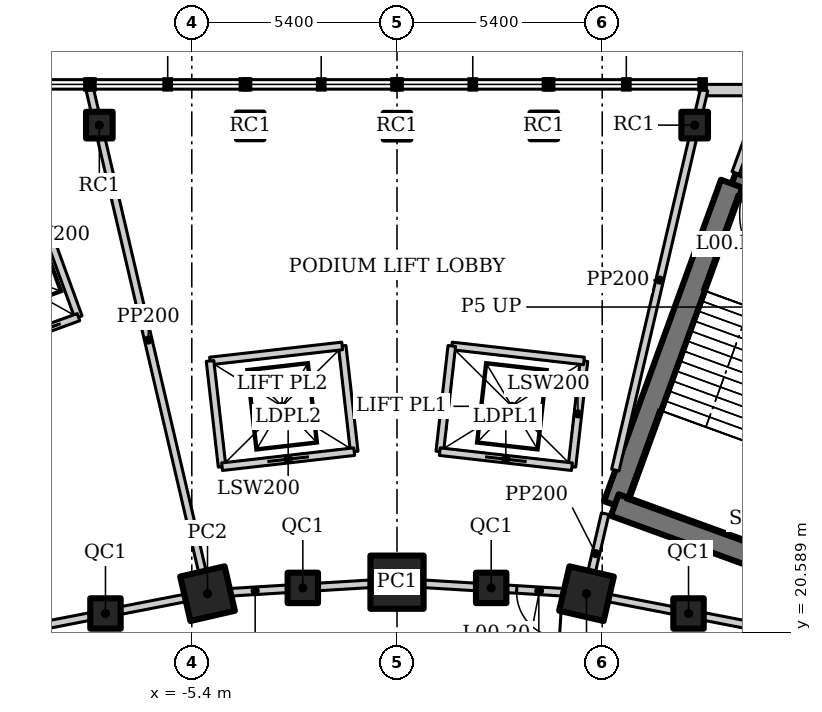
"""IFC4 building model, lengths in metres.
Left out: names, types, materials, properties, quantities, classifications, styles, units other than length and angle.
Written with IfcOpenShell. Run it as: python <this file> out.ifc"""

import sys

from ifc_helpers import new_model, si_unit, direction, frame, frame_2d, origin, origin_2d, place, context, subcontext, project, spatial, rectangle, hollow_rectangle, extrude, element, fill, save


model = new_model("IFC4")
c1 = context("Model", 3, precision=1e-05, world=origin(), true_north=direction((0.0, 1.0)))
c2 = subcontext(c1, "Body", "Model", "MODEL_VIEW")
j1 = project(units=[si_unit("LENGTHUNIT", "METRE"), si_unit("PLANEANGLEUNIT", "RADIAN")], contexts=[c1])
p1 = place(None, origin())
s1 = spatial("IfcSite", under=j1, at=p1, CompositionType="ELEMENT")
p2 = place(p1, origin())
s2 = spatial("IfcBuilding", under=s1, at=p2, CompositionType="ELEMENT")
p3 = place(p2, origin())
s3 = spatial("IfcBuildingStorey", under=s2, at=p3, CompositionType="ELEMENT", Elevation=0.0)
p4 = place(p3, frame((4.986, 21.598, 0.0), z_axis=(0.0, 0.0, 1.0), x_axis=(0.224951054344, 0.974370064785, 0.0)))
e1 = element("IfcColumn", 1, at=p4, inside=s3, PredefinedType="COLUMN", context=c2, shape_type="SweptSolid", body=[
    extrude(hollow_rectangle(XDim=1.2, YDim=1.2, WallThickness=0.1, at=origin_2d()), origin(), (0.0, 0.0, 1.0), 6.5),
])
p5 = place(p3, frame((0.0, 21.9, 0.0), z_axis=(0.0, 0.0, 1.0), x_axis=(1.0, 0.0, 0.0)))
e2 = element("IfcColumn", 2, at=p5, inside=s3, PredefinedType="COLUMN", context=c2, shape_type="SweptSolid", body=[
    extrude(hollow_rectangle(XDim=1.4, YDim=1.4, WallThickness=0.1, at=origin_2d()), origin(), (0.0, 0.0, 1.0), 6.5),
])
p6 = place(p3, frame((-4.986, 21.598, 0.0), z_axis=(0.0, 0.0, 1.0), x_axis=(0.974370064785, 0.224951054344, 0.0)))
e3 = element("IfcColumn", 3, at=p6, inside=s3, PredefinedType="COLUMN", context=c2, shape_type="SweptSolid", body=[
    extrude(hollow_rectangle(XDim=1.2, YDim=1.2, WallThickness=0.1, at=origin_2d()), origin(), (0.0, 0.0, 1.0), 6.5),
])
for number, where, z_axis, x_axis in (
    (4, (7.671, 21.076, 0.0), (0.0, 0.0, 1.0), (1.0, 0.0, 0.0)),
    (5, (2.478, 21.75, 0.0), (0.0, 0.0, 1.0), (1.0, 0.0, 0.0)),
    (6, (-2.478, 21.75, 0.0), (0.0, 0.0, 1.0), (1.0, 0.0, 0.0)),
    (7, (-7.671, 21.076, 0.0), (0.0, 0.0, 1.0), (1.0, 0.0, 0.0)),
):
    element("IfcColumn", number, at=place(p3, frame(where, z_axis=z_axis, x_axis=x_axis)), inside=s3, PredefinedType="COLUMN", context=c2, shape_type="SweptSolid", body=[
        extrude(hollow_rectangle(XDim=0.8, YDim=0.8, WallThickness=0.05, at=origin_2d()), origin(), (0.0, 0.0, 1.0), 6.5),
    ])
for number, where, z_axis, x_axis in (
    (8, (3.863, 33.907, 0.0), (0.0, 0.0, 1.0), (1.0, 0.0, 0.0)),
    (9, (-3.863, 33.907, 0.0), (0.0, 0.0, 1.0), (1.0, 0.0, 0.0)),
    (10, (7.833, 33.928, 0.0), (0.0, 0.0, 1.0), (1.0, 0.0, 0.0)),
    (11, (0.0, 33.9, 0.0), (0.0, 0.0, 1.0), (1.0, 0.0, 0.0)),
    (12, (-7.833, 33.928, 0.0), (0.0, 0.0, 1.0), (1.0, 0.0, 0.0)),
):
    element("IfcColumn", number, at=place(p3, frame(where, z_axis=z_axis, x_axis=x_axis)), inside=s3, PredefinedType="COLUMN", context=c2, shape_type="SweptSolid", body=[
        extrude(hollow_rectangle(XDim=0.7, YDim=0.7, WallThickness=0.04, at=origin_2d()), origin(), (0.0, 0.0, 1.0), 6.5),
    ])
p7 = place(p3, frame((12.779, 34.85, 0.0), z_axis=(0.0, 0.0, 1.0), x_axis=(-1.0, 0.0, 0.0)))
e13 = element("IfcWall", 13, at=p7, inside=s3, PredefinedType="SOLIDWALL", context=c2, shape_type="SweptSolid", body=[
    extrude(rectangle(XDim=4.739, YDim=0.3, at=frame_2d((2.369, 0.0))), origin(), (0.0, 0.0, 1.0), 6.3),
])
p8 = place(p7, frame((0.75, 0.0, 0.0)))
e14 = element("IfcOpeningElement", 14, at=p8, cuts=e13, PredefinedType="OPENING", context=c2, shape_type="SweptSolid", body=[
    extrude(rectangle(XDim=2.0, YDim=2.1, at=frame_2d((1.0, 1.05))), frame((0.0, 0.16, 0.0), z_axis=(0.0, -1.0, 0.0), x_axis=(1.0, 0.0, 0.0)), (0.0, 0.0, 1.0), 0.32),
])
p9 = place(p3, frame((8.911, 32.669, 0.0), z_axis=(0.0, 0.0, 1.0), x_axis=(0.342026533871, 0.939690294793, 0.0)))
e15 = element("IfcWall", 15, at=p9, inside=s3, PredefinedType="SOLIDWALL", context=c2, shape_type="SweptSolid", body=[
    extrude(rectangle(XDim=3.25, YDim=0.2, at=frame_2d((1.625, 0.0))), origin(), (0.0, 0.0, 1.0), 6.3),
])
p10 = place(p3, frame((10.463, 20.534, 0.0), z_axis=(0.0, 0.0, 1.0), x_axis=(-0.98163593748, 0.190763954266, 0.0)))
e16 = element("IfcWall", 16, at=p10, inside=s3, PredefinedType="SOLIDWALL", context=c2, shape_type="SweptSolid", body=[
    extrude(rectangle(XDim=2.844, YDim=0.2, at=frame_2d((1.422, 0.0))), origin(), (0.0, 0.0, 1.0), 5.896),
])
p11 = place(p3, frame((7.671, 21.076, 0.0), z_axis=(0.0, 0.0, 1.0), x_axis=(-0.981637218105, 0.190757364289, 0.0)))
e17 = element("IfcWall", 17, at=p11, inside=s3, PredefinedType="SOLIDWALL", context=c2, shape_type="SweptSolid", body=[
    extrude(rectangle(XDim=2.735, YDim=0.2, at=frame_2d((1.368, 0.0))), origin(), (0.0, 0.0, 1.0), 5.896),
])
p12 = place(p3, frame((4.986, 21.598, 0.0), z_axis=(0.0, 0.0, 1.0), x_axis=(-0.998172405641, 0.060430527186, 0.0)))
e18 = element("IfcWall", 18, at=p12, inside=s3, PredefinedType="SOLIDWALL", context=c2, shape_type="SweptSolid", body=[
    extrude(rectangle(XDim=2.513, YDim=0.2, at=frame_2d((1.256, 0.0))), origin(), (0.0, 0.0, 1.0), 5.896),
])
p13 = place(p12, frame((0.64, 0.0, 0.0)))
e19 = element("IfcOpeningElement", 19, at=p13, cuts=e18, PredefinedType="OPENING", context=c2, shape_type="SweptSolid", body=[
    extrude(rectangle(XDim=1.2, YDim=2.4, at=frame_2d((0.6, 1.2))), frame((0.0, 0.11, 0.0), z_axis=(0.0, -1.0, 0.0), x_axis=(1.0, 0.0, 0.0)), (0.0, 0.0, 1.0), 0.22),
])
p14 = place(p3, frame((2.478, 21.75, 0.0), z_axis=(0.0, 0.0, 1.0), x_axis=(-0.998175328335, 0.060382231685, 0.0)))
e20 = element("IfcWall", 20, at=p14, inside=s3, PredefinedType="SOLIDWALL", context=c2, shape_type="SweptSolid", body=[
    extrude(rectangle(XDim=2.483, YDim=0.2, at=frame_2d((1.241, 0.0))), origin(), (0.0, 0.0, 1.0), 5.774),
])
p15 = place(p3, frame((0.0, 21.9, 0.0), z_axis=(0.0, 0.0, 1.0), x_axis=(-0.998175328335, -0.060382231685, 0.0)))
e21 = element("IfcWall", 21, at=p15, inside=s3, PredefinedType="SOLIDWALL", context=c2, shape_type="SweptSolid", body=[
    extrude(rectangle(XDim=2.483, YDim=0.2, at=frame_2d((1.241, 0.0))), origin(), (0.0, 0.0, 1.0), 5.896),
])
p16 = place(p3, frame((-2.478, 21.75, 0.0), z_axis=(0.0, 0.0, 1.0), x_axis=(-0.998172405641, -0.060430527186, 0.0)))
e22 = element("IfcWall", 22, at=p16, inside=s3, PredefinedType="SOLIDWALL", context=c2, shape_type="SweptSolid", body=[
    extrude(rectangle(XDim=2.513, YDim=0.2, at=frame_2d((1.256, 0.0))), origin(), (0.0, 0.0, 1.0), 5.896),
])
p17 = place(p3, frame((-4.986, 21.598, 0.0), z_axis=(0.0, 0.0, 1.0), x_axis=(-0.981637218105, -0.190757364289, 0.0)))
e23 = element("IfcWall", 23, at=p17, inside=s3, PredefinedType="SOLIDWALL", context=c2, shape_type="SweptSolid", body=[
    extrude(rectangle(XDim=2.735, YDim=0.2, at=frame_2d((1.368, 0.0))), origin(), (0.0, 0.0, 1.0), 5.774),
])
p18 = place(p3, frame((-7.671, 21.076, 0.0), z_axis=(0.0, 0.0, 1.0), x_axis=(-0.98163593748, -0.190763954266, 0.0)))
e24 = element("IfcWall", 24, at=p18, inside=s3, PredefinedType="SOLIDWALL", context=c2, shape_type="SweptSolid", body=[
    extrude(rectangle(XDim=2.844, YDim=0.2, at=frame_2d((1.422, 0.0))), origin(), (0.0, 0.0, 1.0), 5.85),
])
p19 = place(p3, frame((4.986, 21.598, 0.0), z_axis=(0.0, 0.0, 1.0), x_axis=(0.227351065365, 0.973812863479, 0.0)))
e25 = element("IfcWall", 25, at=p19, inside=s3, PredefinedType="SOLIDWALL", context=c2, shape_type="SweptSolid", body=[
    extrude(rectangle(XDim=2.161, YDim=0.2, at=frame_2d((1.08, 0.0))), origin(), (0.0, 0.0, 1.0), 4.8),
])
p20 = place(p3, frame((5.745, 24.849, 0.0), z_axis=(0.0, 0.0, 1.0), x_axis=(0.227353607936, 0.973812269875, 0.0)))
e26 = element("IfcWall", 26, at=p20, inside=s3, PredefinedType="SOLIDWALL", context=c2, shape_type="SweptSolid", body=[
    extrude(rectangle(XDim=10.27, YDim=0.2, at=frame_2d((5.135, 0.0))), origin(), (0.0, 0.0, 1.0), 4.8),
])
p21 = place(p3, frame((-4.986, 21.598, 0.0), z_axis=(0.0, 0.0, 1.0), x_axis=(-0.227372072823, 0.973807958737, 0.0)))
e27 = element("IfcWall", 27, at=p21, inside=s3, PredefinedType="SOLIDWALL", context=c2, shape_type="SweptSolid", body=[
    extrude(rectangle(XDim=13.706, YDim=0.2, at=frame_2d((6.853, 0.0))), origin(), (0.0, 0.0, 1.0), 5.358),
])
p22 = place(p3, frame((14.07, 30.471, 0.0), z_axis=(0.0, 0.0, 1.0), x_axis=(-0.939692822968, 0.342019587834, 0.0)))
e28 = element("IfcWall", 28, at=p22, inside=s3, PredefinedType="SHEAR", context=c2, shape_type="SweptSolid", body=[
    extrude(rectangle(XDim=5.6, YDim=0.6, at=frame_2d((2.8, 0.0))), origin(), (0.0, 0.0, 1.0), 6.5),
])
p23 = place(p22, frame((3.25, 0.0, 0.0)))
e29 = element("IfcOpeningElement", 29, at=p23, cuts=e28, PredefinedType="OPENING", context=c2, shape_type="SweptSolid", body=[
    extrude(rectangle(XDim=2.0, YDim=2.1, at=frame_2d((1.0, 1.05))), frame((0.0, 0.31, 0.0), z_axis=(0.0, -1.0, 0.0), x_axis=(1.0, 0.0, 0.0)), (0.0, 0.0, 1.0), 0.62),
])
p24 = place(p3, frame((8.808, 32.387, 0.0), z_axis=(0.0, 0.0, 1.0), x_axis=(-0.3420218461, -0.939692001025, 0.0)))
e30 = element("IfcWall", 30, at=p24, inside=s3, PredefinedType="SHEAR", context=c2, shape_type="SweptSolid", body=[
    extrude(rectangle(XDim=9.0, YDim=0.6, at=frame_2d((4.5, 0.0))), origin(), (0.0, 0.0, 1.0), 6.5),
])
p25 = place(p3, frame((5.73, 23.93, 0.0), z_axis=(0.0, 0.0, 1.0), x_axis=(0.939678810556, -0.342058084236, 0.0)))
e31 = element("IfcWall", 31, at=p25, inside=s3, PredefinedType="SHEAR", context=c2, shape_type="SweptSolid", body=[
    extrude(rectangle(XDim=5.6, YDim=0.6, at=frame_2d((2.8, 0.0))), origin(), (0.0, 0.0, 1.0), 6.5),
])
p26 = place(p3, frame((4.603, 24.939, 0.0), z_axis=(0.0, 0.0, 1.0), x_axis=(0.113177712989, 0.993574760792, 0.0)))
e32 = element("IfcWall", 32, at=p26, inside=s3, PredefinedType="SOLIDWALL", context=c2, shape_type="SweptSolid", body=[
    extrude(rectangle(XDim=2.8, YDim=0.2, at=frame_2d((1.4, 0.0))), origin(), (0.0, 0.0, 1.0), 6.3),
])
p27 = place(p3, frame((4.92, 27.721, 0.0), z_axis=(0.0, 0.0, 1.0), x_axis=(-0.993571061716, 0.113210182053, 0.0)))
e33 = element("IfcWall", 33, at=p27, inside=s3, PredefinedType="SOLIDWALL", context=c2, shape_type="SweptSolid", body=[
    extrude(rectangle(XDim=3.5, YDim=0.2, at=frame_2d((1.75, 0.0))), origin(), (0.0, 0.0, 1.0), 4.8),
])
p28 = place(p3, frame((1.442, 28.117, 0.0), z_axis=(0.0, 0.0, 1.0), x_axis=(-0.113177712989, -0.993574760792, 0.0)))
e34 = element("IfcWall", 34, at=p28, inside=s3, PredefinedType="SOLIDWALL", context=c2, shape_type="SweptSolid", body=[
    extrude(rectangle(XDim=2.8, YDim=0.2, at=frame_2d((1.4, 0.0))), origin(), (0.0, 0.0, 1.0), 6.3),
])
p29 = place(p3, frame((1.125, 25.335, 0.0), z_axis=(0.0, 0.0, 1.0), x_axis=(0.993571061716, -0.113210182053, 0.0)))
e35 = element("IfcWall", 35, at=p29, inside=s3, PredefinedType="SOLIDWALL", context=c2, shape_type="SweptSolid", body=[
    extrude(rectangle(XDim=3.5, YDim=0.2, at=frame_2d((1.75, 0.0))), origin(), (0.0, 0.0, 1.0), 4.8),
])
p30 = place(p29, frame((1.2, 0.0, 0.0)))
e36 = element("IfcOpeningElement", 36, at=p30, cuts=e35, PredefinedType="OPENING", context=c2, shape_type="SweptSolid", body=[
    extrude(rectangle(XDim=1.1, YDim=2.2, at=frame_2d((0.55, 1.1))), frame((0.0, 0.11, 0.0), z_axis=(0.0, -1.0, 0.0), x_axis=(1.0, 0.0, 0.0)), (0.0, 0.0, 1.0), 0.22),
])
p31 = place(p3, frame((-1.125, 25.335, 0.0), z_axis=(0.0, 0.0, 1.0), x_axis=(-0.113177712989, 0.993574760792, 0.0)))
e37 = element("IfcWall", 37, at=p31, inside=s3, PredefinedType="SOLIDWALL", context=c2, shape_type="SweptSolid", body=[
    extrude(rectangle(XDim=2.8, YDim=0.2, at=frame_2d((1.4, 0.0))), origin(), (0.0, 0.0, 1.0), 6.3),
])
p32 = place(p3, frame((-1.442, 28.117, 0.0), z_axis=(0.0, 0.0, 1.0), x_axis=(-0.993571061716, -0.113210182053, 0.0)))
e38 = element("IfcWall", 38, at=p32, inside=s3, PredefinedType="SOLIDWALL", context=c2, shape_type="SweptSolid", body=[
    extrude(rectangle(XDim=3.5, YDim=0.2, at=frame_2d((1.75, 0.0))), origin(), (0.0, 0.0, 1.0), 6.3),
])
p33 = place(p3, frame((-4.92, 27.721, 0.0), z_axis=(0.0, 0.0, 1.0), x_axis=(0.113177712989, -0.993574760792, 0.0)))
e39 = element("IfcWall", 39, at=p33, inside=s3, PredefinedType="SOLIDWALL", context=c2, shape_type="SweptSolid", body=[
    extrude(rectangle(XDim=2.8, YDim=0.2, at=frame_2d((1.4, 0.0))), origin(), (0.0, 0.0, 1.0), 6.3),
])
p34 = place(p3, frame((-4.603, 24.939, 0.0), z_axis=(0.0, 0.0, 1.0), x_axis=(0.993571061716, 0.113210182053, 0.0)))
e40 = element("IfcWall", 40, at=p34, inside=s3, PredefinedType="SOLIDWALL", context=c2, shape_type="SweptSolid", body=[
    extrude(rectangle(XDim=3.5, YDim=0.2, at=frame_2d((1.75, 0.0))), origin(), (0.0, 0.0, 1.0), 6.3),
])
p35 = place(p34, frame((1.2, 0.0, 0.0)))
e41 = element("IfcOpeningElement", 41, at=p35, cuts=e40, PredefinedType="OPENING", context=c2, shape_type="SweptSolid", body=[
    extrude(rectangle(XDim=1.1, YDim=2.2, at=frame_2d((0.55, 1.1))), frame((0.0, 0.11, 0.0), z_axis=(0.0, -1.0, 0.0), x_axis=(1.0, 0.0, 0.0)), (0.0, 0.0, 1.0), 0.22),
])
p36 = place(p3, frame((-8.381, 28.875, 0.0), z_axis=(0.0, 0.0, 1.0), x_axis=(-0.342045591466, 0.93968335803, 0.0)))
e42 = element("IfcWall", 42, at=p36, inside=s3, PredefinedType="SOLIDWALL", context=c2, shape_type="SweptSolid", body=[
    extrude(rectangle(XDim=4.6, YDim=0.2, at=frame_2d((2.3, 0.0))), origin(), (0.0, 0.0, 1.0), 6.3),
])
p37 = place(p3, frame((-12.14, 27.507, 0.0), z_axis=(0.0, 0.0, 1.0), x_axis=(0.939706071622, 0.341983185197, 0.0)))
e43 = element("IfcWall", 43, at=p37, inside=s3, PredefinedType="SOLIDWALL", context=c2, shape_type="SweptSolid", body=[
    extrude(rectangle(XDim=4.0, YDim=0.2, at=frame_2d((2.0, 0.0))), origin(), (0.0, 0.0, 1.0), 6.3),
])
p38 = place(p37, frame((0.5, 0.0, 0.0)))
e44 = element("IfcOpeningElement", 44, at=p38, cuts=e43, PredefinedType="OPENING", context=c2, shape_type="SweptSolid", body=[
    extrude(rectangle(XDim=3.0, YDim=3.0, at=frame_2d((1.5, 1.5))), frame((0.0, 0.11, 0.0), z_axis=(0.0, -1.0, 0.0), x_axis=(1.0, 0.0, 0.0)), (0.0, 0.0, 1.0), 0.22),
])
p39 = place(p13, origin())
e45 = element("IfcDoor", 45, at=p39, inside=s3, OperationType="SINGLE_SWING_RIGHT", PredefinedType="DOOR", context=c2, shape_type="SweptSolid", body=[
    extrude(rectangle(XDim=1.2, YDim=2.4, at=frame_2d((0.6, 1.2))), frame((0.0, 0.025, 0.0), z_axis=(0.0, -1.0, 0.0), x_axis=(1.0, 0.0, 0.0)), (0.0, 0.0, 1.0), 0.05),
])
fill(e19, e45)
p40 = place(p30, origin())
e46 = element("IfcDoor", 46, at=p40, inside=s3, OperationType="DOUBLE_DOOR_SLIDING", PredefinedType="DOOR", context=c2, shape_type="SweptSolid", body=[
    extrude(rectangle(XDim=1.1, YDim=2.2, at=frame_2d((0.55, 1.1))), frame((0.0, 0.025, 0.0), z_axis=(0.0, -1.0, 0.0), x_axis=(1.0, 0.0, 0.0)), (0.0, 0.0, 1.0), 0.05),
])
fill(e36, e46)
p41 = place(p35, origin())
e47 = element("IfcDoor", 47, at=p41, inside=s3, OperationType="DOUBLE_DOOR_SLIDING", PredefinedType="DOOR", context=c2, shape_type="SweptSolid", body=[
    extrude(rectangle(XDim=1.1, YDim=2.2, at=frame_2d((0.55, 1.1))), frame((0.0, 0.025, 0.0), z_axis=(0.0, -1.0, 0.0), x_axis=(1.0, 0.0, 0.0)), (0.0, 0.0, 1.0), 0.05),
])
fill(e41, e47)
p42 = place(p38, origin())
e48 = element("IfcDoor", 48, at=p42, inside=s3, OperationType="DOUBLE_DOOR_SLIDING", PredefinedType="DOOR", context=c2, shape_type="SweptSolid", body=[
    extrude(rectangle(XDim=3.0, YDim=3.0, at=frame_2d((1.5, 1.5))), frame((0.0, 0.025, 0.0), z_axis=(0.0, -1.0, 0.0), x_axis=(1.0, 0.0, 0.0)), (0.0, 0.0, 1.0), 0.05),
])
fill(e44, e48)
save(model, sys.argv[1])
